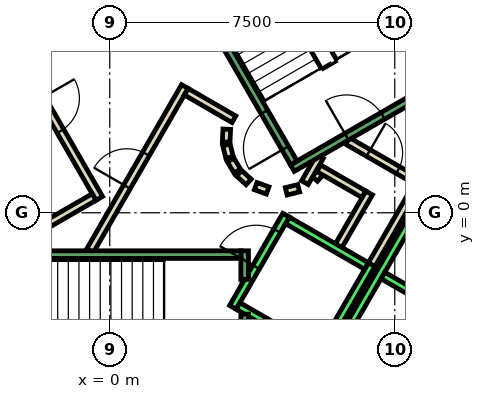
"""IFC4 building model, lengths in metres.
Left out: names, types, materials, properties, quantities, classifications, styles, units other than length and angle.
Written with IfcOpenShell. Run it as: python <this file> out.ifc"""

import sys

from ifc_helpers import new_model, si_unit, direction, frame, frame_2d, origin, place, context, subcontext, project, spatial, polyline, rectangle, outline, extrude, element, fill, save


model = new_model("IFC4")
c1 = context("Model", 3, precision=1e-05, world=origin(), true_north=direction((0.0, 1.0)))
c2 = subcontext(c1, "Body", "Model", "MODEL_VIEW")
j1 = project(units=[si_unit("LENGTHUNIT", "METRE"), si_unit("PLANEANGLEUNIT", "RADIAN")], contexts=[c1])
p1 = place(None, origin())
s1 = spatial("IfcSite", under=j1, at=p1, CompositionType="ELEMENT")
p2 = place(p1, origin())
s2 = spatial("IfcBuilding", under=s1, at=p2, CompositionType="ELEMENT")
p3 = place(p2, frame((0.0, 0.0, 90.8)))
s3 = spatial("IfcBuildingStorey", under=s2, at=p3, CompositionType="ELEMENT", Elevation=90.8)
p4 = place(p3, frame((0.0, 0.0, -0.4)))
e1 = element("IfcWall", 1, at=p4, inside=s3, PredefinedType="SHEAR", context=c2, shape_type="SweptSolid", body=[
    extrude(outline(polyline([(8.517, 11.748), (7.738, 11.298), (12.817, 2.5), (13.856, 2.5), (8.517, 11.748)])), origin(), (0.0, 0.0, 1.0), 4.2),
])
p5 = place(p3, frame((5.39, 0.898, 0.0), z_axis=(0.0, 0.0, 1.0), x_axis=(0.673828488714, 0.738887791073, 0.0)))
e2 = element("IfcWall", 2, at=p5, inside=s3, PredefinedType="PARTITIONING", context=c2, shape_type="SweptSolid", body=[
    extrude(rectangle(XDim=0.263, YDim=0.2, at=frame_2d((0.131, 0.0))), origin(), (0.0, 0.0, 1.0), 3.8),
])
p6 = place(p3, frame((5.499, 1.172, 0.0), z_axis=(0.0, 0.0, 1.0), x_axis=(0.866333505267, -0.499465972466, 0.0)))
e3 = element("IfcWall", 3, at=p6, inside=s3, PredefinedType="PARTITIONING", context=c2, shape_type="SweptSolid", body=[
    extrude(rectangle(XDim=1.374, YDim=0.2, at=frame_2d((0.687, 0.0))), origin(), (0.0, 0.0, 1.0), 3.8),
])
p7 = place(p3, frame((6.826, 0.522, 0.0), z_axis=(0.0, 0.0, 1.0), x_axis=(-0.500016722714, -0.866015748706, 0.0)))
e4 = element("IfcWall", 4, at=p7, inside=s3, PredefinedType="PARTITIONING", context=c2, shape_type="SweptSolid", body=[
    extrude(rectangle(XDim=1.7, YDim=0.2, at=frame_2d((0.85, 0.0))), origin(), (0.0, 0.0, 1.0), 3.8),
])
p8 = place(p3, frame((6.25, 1.894, 0.0), z_axis=(0.0, 0.0, 1.0), x_axis=(0.866043184279, -0.499969202016, 0.0)))
e5 = element("IfcWall", 5, at=p8, inside=s3, PredefinedType="PARTITIONING", context=c2, shape_type="SweptSolid", body=[
    extrude(rectangle(XDim=2.084, YDim=0.2, at=frame_2d((1.042, 0.0))), origin(), (0.0, 0.0, 1.0), 3.8),
])
p9 = place(p8, frame((0.642, 0.0, 0.0)))
e6 = element("IfcOpeningElement", 6, at=p9, cuts=e5, PredefinedType="OPENING", context=c2, shape_type="SweptSolid", body=[
    extrude(rectangle(XDim=0.9, YDim=2.1, at=frame_2d((0.45, 1.05))), frame((0.0, 0.11, 0.0), z_axis=(0.0, -1.0, 0.0), x_axis=(1.0, 0.0, 0.0)), (0.0, 0.0, 1.0), 0.22),
])
p10 = place(p3, frame((8.192, 0.888, 0.0), z_axis=(0.0, 0.0, 1.0), x_axis=(-0.499940625693, -0.866059680843, 0.0)))
e7 = element("IfcWall", 7, at=p10, inside=s3, PredefinedType="PARTITIONING", context=c2, shape_type="SweptSolid", body=[
    extrude(rectangle(XDim=2.68, YDim=0.2, at=frame_2d((1.34, 0.0))), origin(), (0.0, 0.0, 1.0), 3.8),
])
p11 = place(p3, frame((5.135, 0.793, 0.0), z_axis=(0.0, 0.0, 1.0), x_axis=(0.499526442893, 0.866298639529, 0.0)))
e8 = element("IfcWall", 8, at=p11, inside=s3, PredefinedType="PARTITIONING", context=c2, shape_type="SweptSolid", body=[
    extrude(rectangle(XDim=0.791, YDim=0.2, at=frame_2d((0.396, 0.0))), origin(), (0.0, 0.0, 1.0), 3.8),
])
p12 = place(p3, frame((-0.52, -1.0, 0.0), z_axis=(0.0, 0.0, 1.0), x_axis=(0.50011622646, 0.865958290007, 0.0)))
e9 = element("IfcWall", 9, at=p12, inside=s3, PredefinedType="PARTITIONING", context=c2, shape_type="SweptSolid", body=[
    extrude(rectangle(XDim=4.991, YDim=0.2, at=frame_2d((2.496, 0.0))), origin(), (0.0, 0.0, 1.0), 3.8),
])
p13 = place(p12, frame((1.945, 0.0, 0.0)))
e10 = element("IfcOpeningElement", 10, at=p13, cuts=e9, PredefinedType="OPENING", context=c2, shape_type="SweptSolid", body=[
    extrude(rectangle(XDim=1.0, YDim=2.1, at=frame_2d((0.5, 1.05))), frame((0.0, 0.11, 0.0), z_axis=(0.0, -1.0, 0.0), x_axis=(1.0, 0.0, 0.0)), (0.0, 0.0, 1.0), 0.22),
])
p14 = place(p3, frame((2.012, 3.186, 0.0), z_axis=(0.0, 0.0, 1.0), x_axis=(0.865891012941, -0.500232699559, 0.0)))
e11 = element("IfcWall", 11, at=p14, inside=s3, PredefinedType="PARTITIONING", context=c2, shape_type="SweptSolid", body=[
    extrude(rectangle(XDim=1.449, YDim=0.2, at=frame_2d((0.725, 0.0))), origin(), (0.0, 0.0, 1.0), 3.8),
])
p15 = place(p3, frame((3.079, 2.199, 0.0), z_axis=(0.0, 0.0, 1.0), x_axis=(-0.047771483479, -0.998858290933, 0.0)))
e12 = element("IfcWall", 12, at=p15, inside=s3, PredefinedType="PARTITIONING", context=c2, shape_type="SweptSolid", body=[
    extrude(rectangle(XDim=0.337, YDim=0.2, at=frame_2d((0.169, 0.0))), origin(), (0.0, 0.0, 1.0), 3.8),
])
p16 = place(p3, frame((3.07, 1.786, 0.0), z_axis=(0.0, 0.0, 1.0), x_axis=(0.242705583207, -0.970099994784, 0.0)))
e13 = element("IfcWall", 13, at=p16, inside=s3, PredefinedType="PARTITIONING", context=c2, shape_type="SweptSolid", body=[
    extrude(rectangle(XDim=0.338, YDim=0.2, at=frame_2d((0.169, 0.0))), origin(), (0.0, 0.0, 1.0), 3.8),
])
for number, where, z_axis, x_axis in (
    (14, (3.182, 1.388, 0.0), (0.0, 0.0, 1.0), (0.512, -0.859, 0.0)),
    (15, (3.404, 1.039, 0.0), (0.0, 0.0, 1.0), (0.74, -0.672, 0.0)),
):
    element("IfcWall", number, at=place(p3, frame(where, z_axis=z_axis, x_axis=x_axis)), inside=s3, PredefinedType="PARTITIONING", context=c2, shape_type="SweptSolid", body=[
        extrude(rectangle(XDim=0.338, YDim=0.2, at=frame_2d((0.169, 0.0))), origin(), (0.0, 0.0, 1.0), 3.8),
    ])
p17 = place(p3, frame((3.838, 0.702, 0.0), z_axis=(0.0, 0.0, 1.0), x_axis=(0.941035081519, -0.338308993895, 0.0)))
e16 = element("IfcWall", 16, at=p17, inside=s3, PredefinedType="PARTITIONING", context=c2, shape_type="SweptSolid", body=[
    extrude(rectangle(XDim=0.337, YDim=0.2, at=frame_2d((0.168, 0.0))), origin(), (0.0, 0.0, 1.0), 3.8),
])
p18 = place(p3, frame((4.644, 0.564, 0.0), z_axis=(0.0, 0.0, 1.0), x_axis=(0.969929076366, 0.243387729394, 0.0)))
e17 = element("IfcWall", 17, at=p18, inside=s3, PredefinedType="PARTITIONING", context=c2, shape_type="SweptSolid", body=[
    extrude(rectangle(XDim=0.337, YDim=0.2, at=frame_2d((0.168, 0.0))), origin(), (0.0, 0.0, 1.0), 3.8),
])
p19 = place(p3, frame((-2.771, 4.7, 0.0), z_axis=(0.0, 0.0, 1.0), x_axis=(0.499969479948, -0.866043023828, 0.0)))
e18 = element("IfcWall", 18, at=p19, inside=s3, PredefinedType="PARTITIONING", context=c2, shape_type="SweptSolid", body=[
    extrude(rectangle(XDim=4.99, YDim=0.2, at=frame_2d((2.495, 0.0))), origin(), (0.0, 0.0, 1.0), 3.8),
])
p20 = place(p19, frame((1.945, 0.0, 0.0)))
e19 = element("IfcOpeningElement", 19, at=p20, cuts=e18, PredefinedType="OPENING", context=c2, shape_type="SweptSolid", body=[
    extrude(rectangle(XDim=1.0, YDim=2.1, at=frame_2d((0.5, 1.05))), frame((0.0, 0.11, 0.0), z_axis=(0.0, -1.0, 0.0), x_axis=(1.0, 0.0, 0.0)), (0.0, 0.0, 1.0), 0.22),
])
p21 = place(p3, frame((-0.412, 0.414, 0.0), z_axis=(0.0, 0.0, 1.0), x_axis=(-0.866017369001, -0.500013916395, 0.0)))
e20 = element("IfcWall", 20, at=p21, inside=s3, PredefinedType="PARTITIONING", context=c2, shape_type="SweptSolid", body=[
    extrude(rectangle(XDim=1.45, YDim=0.2, at=frame_2d((0.725, 0.0))), origin(), (0.0, 0.0, 1.0), 3.8),
])
p22 = place(p3, frame((3.24, -2.488, 0.0), z_axis=(0.0, 0.0, 1.0), x_axis=(0.49994636267, 0.866056369097, 0.0)))
e21 = element("IfcWall", 21, at=p22, inside=s3, PredefinedType="STANDARD", context=c2, shape_type="SweptSolid", body=[
    extrude(rectangle(XDim=2.8, YDim=0.2, at=frame_2d((1.4, 0.0))), origin(), (0.0, 0.0, 1.0), 3.8),
])
p23 = place(p22, frame((1.225, 0.0, 0.0)))
e22 = element("IfcOpeningElement", 22, at=p23, cuts=e21, PredefinedType="OPENING", context=c2, shape_type="SweptSolid", body=[
    extrude(rectangle(XDim=1.1, YDim=2.1, at=frame_2d((0.55, 1.05))), frame((0.0, 0.11, 0.0), z_axis=(0.0, -1.0, 0.0), x_axis=(1.0, 0.0, 0.0)), (0.0, 0.0, 1.0), 0.22),
])
p24 = place(p3, frame((5.492, -3.788, 0.0), z_axis=(0.0, 0.0, 1.0), x_axis=(0.500011755427, 0.866018616679, 0.0)))
e23 = element("IfcWall", 23, at=p24, inside=s3, PredefinedType="STANDARD", context=c2, shape_type="SweptSolid", body=[
    extrude(rectangle(XDim=2.8, YDim=0.2, at=frame_2d((1.4, 0.0))), origin(), (0.0, 0.0, 1.0), 3.8),
])
p25 = place(p3, frame((3.377, -2.452, 0.0), z_axis=(0.0, 0.0, 1.0), x_axis=(0.865955154139, -0.50012165622, 0.0)))
e24 = element("IfcWall", 24, at=p25, inside=s3, PredefinedType="STANDARD", context=c2, shape_type="SweptSolid", body=[
    extrude(rectangle(XDim=2.4, YDim=0.2, at=frame_2d((1.2, 0.0))), origin(), (0.0, 0.0, 1.0), 3.8),
])
p26 = place(p3, frame((4.677, -0.2, 0.0), z_axis=(0.0, 0.0, 1.0), x_axis=(0.865973769406, -0.500089422704, 0.0)))
e25 = element("IfcWall", 25, at=p26, inside=s3, PredefinedType="STANDARD", context=c2, shape_type="SweptSolid", body=[
    extrude(rectangle(XDim=2.399, YDim=0.2, at=frame_2d((1.2, 0.0))), origin(), (0.0, 0.0, 1.0), 3.8),
])
p27 = place(p3, frame((4.451, -6.19, 0.0), z_axis=(0.0, 0.0, 1.0), x_axis=(0.50000090737, 0.866024879913, 0.0)))
e26 = element("IfcWall", 26, at=p27, inside=s3, PredefinedType="STANDARD", context=c2, shape_type="SweptSolid", body=[
    extrude(rectangle(XDim=10.6, YDim=0.2, at=frame_2d((5.3, 0.0))), origin(), (0.0, 0.0, 1.0), 3.8),
])
p28 = place(p3, frame((7.188, -1.65, 0.0), z_axis=(0.0, 0.0, 1.0), x_axis=(0.866022959057, -0.500004234368, 0.0)))
e27 = element("IfcWall", 27, at=p28, inside=s3, PredefinedType="STANDARD", context=c2, shape_type="SweptSolid", body=[
    extrude(rectangle(XDim=2.5, YDim=0.2, at=frame_2d((1.25, 0.0))), origin(), (0.0, 0.0, 1.0), 3.8),
])
p29 = place(p3, frame((3.55, -2.667, 0.0), z_axis=(0.0, 0.0, 1.0), x_axis=(0.0, -1.0, 0.0)))
e28 = element("IfcWall", 28, at=p29, inside=s3, PredefinedType="STANDARD", context=c2, shape_type="SweptSolid", body=[
    extrude(rectangle(XDim=2.733, YDim=0.2, at=frame_2d((1.366, 0.0))), origin(), (0.0, 0.0, 1.0), 3.8),
])
p30 = place(p3, frame((3.55, -1.0, 0.0), z_axis=(0.0, 0.0, 1.0), x_axis=(0.0, -1.0, 0.0)))
e29 = element("IfcWall", 29, at=p30, inside=s3, PredefinedType="STANDARD", context=c2, shape_type="SweptSolid", body=[
    extrude(rectangle(XDim=0.751, YDim=0.2, at=frame_2d((0.375, 0.0))), origin(), (0.0, 0.0, 1.0), 3.8),
])
p31 = place(p3, frame((-3.45, -1.1, 0.0), z_axis=(0.0, 0.0, 1.0), x_axis=(1.0, 0.0, 0.0)))
e30 = element("IfcWall", 30, at=p31, inside=s3, PredefinedType="STANDARD", context=c2, shape_type="SweptSolid", body=[
    extrude(rectangle(XDim=6.9, YDim=0.2, at=frame_2d((3.45, 0.0))), origin(), (0.0, 0.0, 1.0), 3.8),
])
p32 = place(p31, frame((0.45, 0.0, 0.0)))
e31 = element("IfcOpeningElement", 31, at=p32, cuts=e30, PredefinedType="OPENING", context=c2, shape_type="SweptSolid", body=[
    extrude(rectangle(XDim=1.1, YDim=2.2, at=frame_2d((0.55, 1.1))), frame((0.0, 0.11, 0.0), z_axis=(0.0, -1.0, 0.0), x_axis=(1.0, 0.0, 0.0)), (0.0, 0.0, 1.0), 0.22),
])
p33 = place(p3, frame((4.806, 1.176, 0.0), z_axis=(0.0, 0.0, 1.0), x_axis=(0.866059941101, 0.499940174841, 0.0)))
e32 = element("IfcWall", 32, at=p33, inside=s3, PredefinedType="STANDARD", context=c2, shape_type="SweptSolid", body=[
    extrude(rectangle(XDim=4.4, YDim=0.2, at=frame_2d((2.2, 0.0))), origin(), (0.0, 0.0, 1.0), 3.8),
])
p34 = place(p33, frame((1.65, 0.0, 0.0)))
e33 = element("IfcOpeningElement", 33, at=p34, cuts=e32, PredefinedType="OPENING", context=c2, shape_type="SweptSolid", body=[
    extrude(rectangle(XDim=1.1, YDim=2.2, at=frame_2d((0.55, 1.1))), frame((0.0, 0.11, 0.0), z_axis=(0.0, -1.0, 0.0), x_axis=(1.0, 0.0, 0.0)), (0.0, 0.0, 1.0), 0.22),
])
p35 = place(p3, frame((4.843, 1.312, 0.0), z_axis=(0.0, 0.0, 1.0), x_axis=(-0.499963383562, 0.866046543262, 0.0)))
e34 = element("IfcWall", 34, at=p35, inside=s3, PredefinedType="STANDARD", context=c2, shape_type="SweptSolid", body=[
    extrude(rectangle(XDim=6.9, YDim=0.2, at=frame_2d((3.45, 0.0))), origin(), (0.0, 0.0, 1.0), 3.8),
])
p36 = place(p35, frame((0.45, 0.0, 0.0)))
e35 = element("IfcOpeningElement", 35, at=p36, cuts=e34, PredefinedType="OPENING", context=c2, shape_type="SweptSolid", body=[
    extrude(rectangle(XDim=1.1, YDim=2.2, at=frame_2d((0.55, 1.1))), frame((0.0, 0.11, 0.0), z_axis=(0.0, -1.0, 0.0), x_axis=(1.0, 0.0, 0.0)), (0.0, 0.0, 1.0), 0.22),
])
p37 = place(p3, frame((8.48, 3.412, 0.0), z_axis=(0.0, 0.0, 1.0), x_axis=(-0.499978703459, 0.866037698999, 0.0)))
e36 = element("IfcWall", 36, at=p37, inside=s3, PredefinedType="STANDARD", context=c2, shape_type="SweptSolid", body=[
    extrude(rectangle(XDim=6.9, YDim=0.2, at=frame_2d((3.45, 0.0))), origin(), (0.0, 0.0, 1.0), 3.8),
])
p38 = place(p3, frame((-1.393, 7.288, 0.0), z_axis=(0.0, 0.0, 1.0), x_axis=(-0.499963383562, -0.866046543262, 0.0)))
e37 = element("IfcWall", 37, at=p38, inside=s3, PredefinedType="STANDARD", context=c2, shape_type="SweptSolid", body=[
    extrude(rectangle(XDim=6.9, YDim=0.2, at=frame_2d((3.45, 0.0))), origin(), (0.0, 0.0, 1.0), 3.8),
])
p39 = place(p38, frame((0.45, 0.0, 0.0)))
e38 = element("IfcOpeningElement", 38, at=p39, cuts=e37, PredefinedType="OPENING", context=c2, shape_type="SweptSolid", body=[
    extrude(rectangle(XDim=1.1, YDim=2.2, at=frame_2d((0.55, 1.1))), frame((0.0, 0.11, 0.0), z_axis=(0.0, -1.0, 0.0), x_axis=(1.0, 0.0, 0.0)), (0.0, 0.0, 1.0), 0.22),
])
p40 = place(p13, origin())
e39 = element("IfcDoor", 39, at=p40, inside=s3, OperationType="SINGLE_SWING_LEFT", PredefinedType="DOOR", context=c2, shape_type="SweptSolid", body=[
    extrude(rectangle(XDim=1.0, YDim=2.1, at=frame_2d((0.5, 1.05))), frame((0.0, 0.025, 0.0), z_axis=(0.0, -1.0, 0.0), x_axis=(1.0, 0.0, 0.0)), (0.0, 0.0, 1.0), 0.05),
])
fill(e10, e39)
p41 = place(p20, origin())
e40 = element("IfcDoor", 40, at=p41, inside=s3, OperationType="SINGLE_SWING_RIGHT", PredefinedType="DOOR", context=c2, shape_type="SweptSolid", body=[
    extrude(rectangle(XDim=1.0, YDim=2.1, at=frame_2d((0.5, 1.05))), frame((0.0, 0.025, 0.0), z_axis=(0.0, -1.0, 0.0), x_axis=(1.0, 0.0, 0.0)), (0.0, 0.0, 1.0), 0.05),
])
fill(e19, e40)
p42 = place(p9, origin())
e41 = element("IfcDoor", 41, at=p42, inside=s3, OperationType="SINGLE_SWING_LEFT", PredefinedType="DOOR", context=c2, shape_type="SweptSolid", body=[
    extrude(rectangle(XDim=0.9, YDim=2.1, at=frame_2d((0.45, 1.05))), frame((0.0, 0.025, 0.0), z_axis=(0.0, -1.0, 0.0), x_axis=(1.0, 0.0, 0.0)), (0.0, 0.0, 1.0), 0.05),
])
fill(e6, e41)
p43 = place(p23, origin())
e42 = element("IfcDoor", 42, at=p43, inside=s3, OperationType="SLIDING_TO_LEFT", PredefinedType="DOOR", context=c2, shape_type="SweptSolid", body=[
    extrude(rectangle(XDim=1.1, YDim=2.1, at=frame_2d((0.55, 1.05))), frame((0.0, 0.025, 0.0), z_axis=(0.0, -1.0, 0.0), x_axis=(1.0, 0.0, 0.0)), (0.0, 0.0, 1.0), 0.05),
])
fill(e22, e42)
p44 = place(p36, origin())
e43 = element("IfcDoor", 43, at=p44, inside=s3, OperationType="SINGLE_SWING_LEFT", PredefinedType="DOOR", context=c2, shape_type="SweptSolid", body=[
    extrude(rectangle(XDim=1.1, YDim=2.2, at=frame_2d((0.55, 1.1))), frame((0.0, 0.025, 0.0), z_axis=(0.0, -1.0, 0.0), x_axis=(1.0, 0.0, 0.0)), (0.0, 0.0, 1.0), 0.05),
])
fill(e35, e43)
p45 = place(p34, origin())
e44 = element("IfcDoor", 44, at=p45, inside=s3, OperationType="SINGLE_SWING_LEFT", PredefinedType="DOOR", context=c2, shape_type="SweptSolid", body=[
    extrude(rectangle(XDim=1.1, YDim=2.2, at=frame_2d((0.55, 1.1))), frame((0.0, 0.025, 0.0), z_axis=(0.0, -1.0, 0.0), x_axis=(1.0, 0.0, 0.0)), (0.0, 0.0, 1.0), 0.05),
])
fill(e33, e44)
save(model, sys.argv[1])
